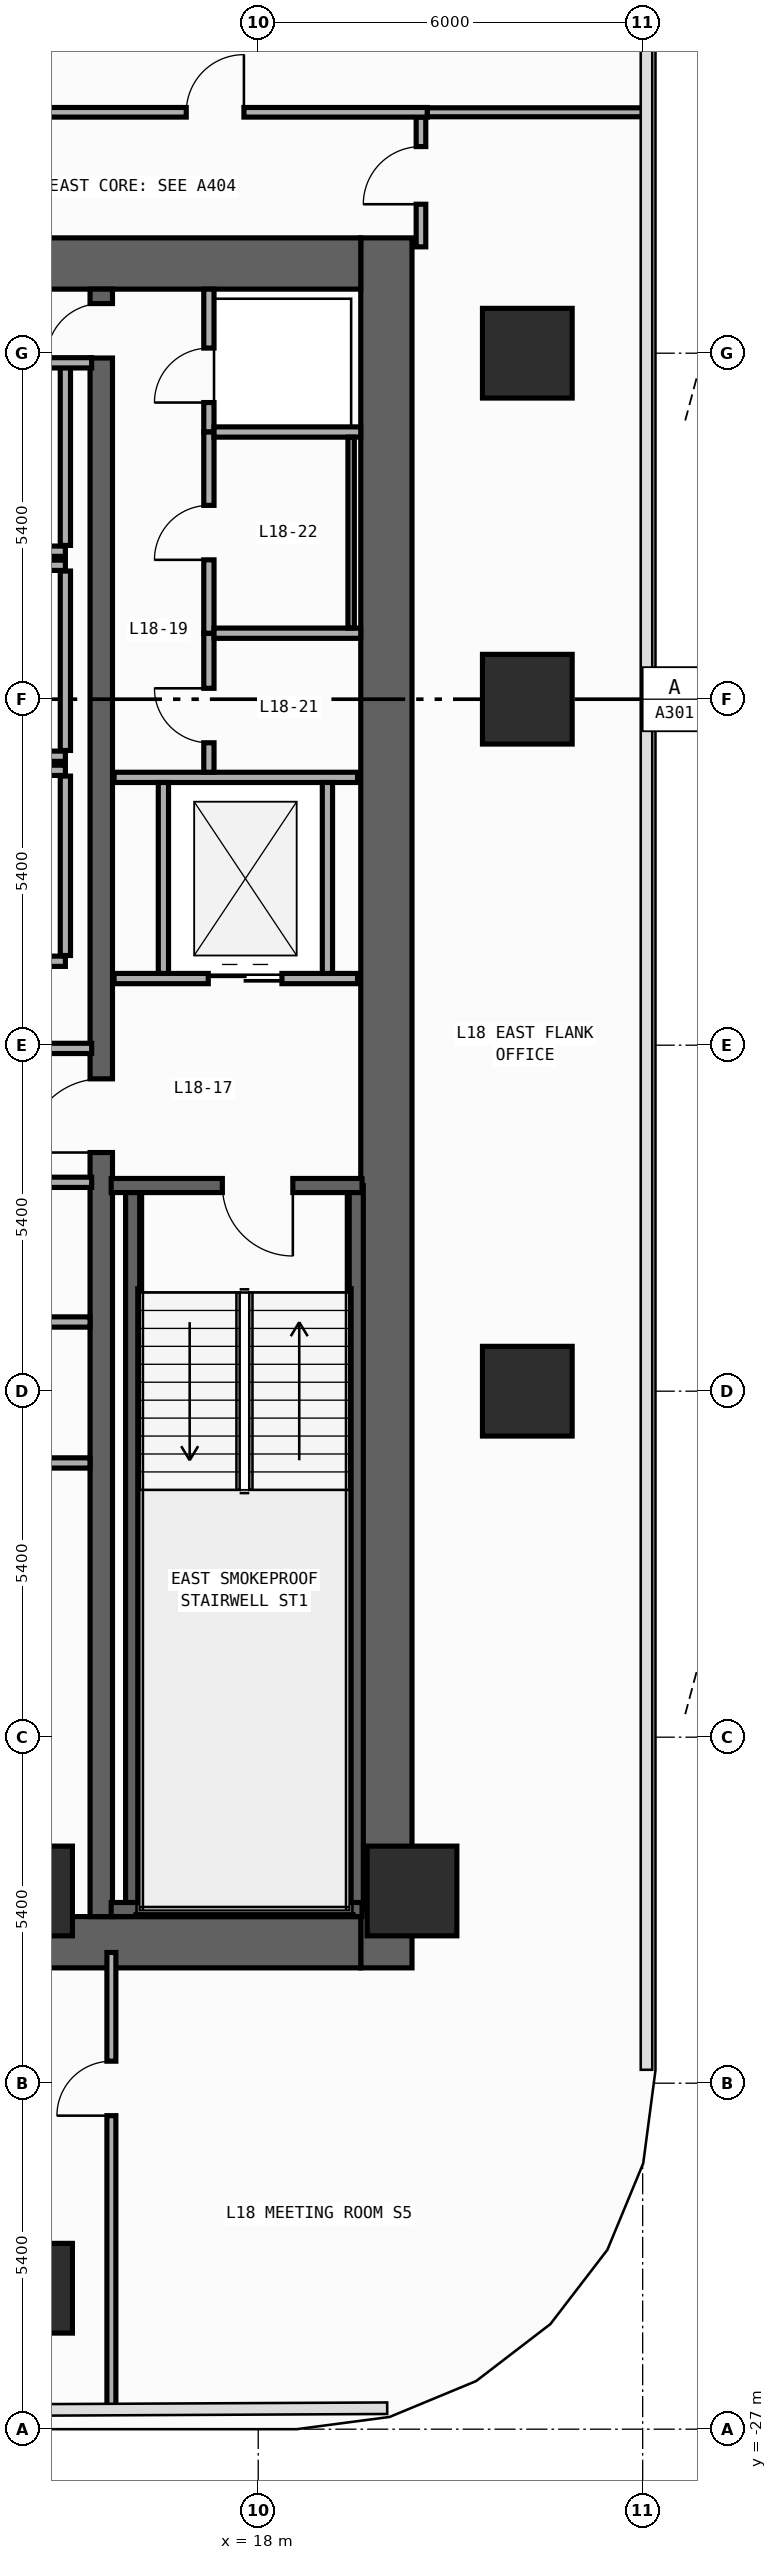
"""IFC4 building model, lengths in metres.
Left out: names, types, materials, properties, quantities, classifications, styles, units other than length and angle.
Written with IfcOpenShell. Run it as: python <this file> out.ifc"""

import sys

from ifc_helpers import new_model, si_unit, direction, frame, frame_2d, origin, origin_2d, place, context, subcontext, project, spatial, rectangle, extrude, element, fill, save


model = new_model("IFC4")
c1 = context("Model", 3, precision=1e-05, world=origin(), true_north=direction((0.0, 1.0)))
c2 = subcontext(c1, "Body", "Model", "MODEL_VIEW")
j1 = project(units=[si_unit("LENGTHUNIT", "METRE"), si_unit("PLANEANGLEUNIT", "RADIAN")], contexts=[c1])
p1 = place(None, origin())
s1 = spatial("IfcSite", under=j1, at=p1, CompositionType="ELEMENT")
p2 = place(p1, origin())
s2 = spatial("IfcBuilding", under=s1, at=p2, CompositionType="ELEMENT")
p3 = place(p2, frame((0.0, 0.0, 76.4)))
s3 = spatial("IfcBuildingStorey", under=s2, at=p3, CompositionType="ELEMENT", Elevation=76.4)
p4 = place(p3, frame((20.0, -19.8, 0.0), z_axis=(0.0, 0.0, 1.0), x_axis=(0.0, 1.0, 0.0)))
e1 = element("IfcWall", 1, at=p4, inside=s3, PredefinedType="SHEAR", context=c2, shape_type="SweptSolid", body=[
    extrude(rectangle(XDim=27.0, YDim=0.8, at=frame_2d((13.5, 0.0))), origin(), (0.0, 0.0, 1.0), 3.94),
])
for number, where, z_axis, x_axis in (
    (2, (12.8, -19.4, 0.0), (0.0, 0.0, 1.0), (1.0, 0.0, 0.0)),
    (3, (12.8, 6.8, 0.0), (0.0, 0.0, 1.0), (1.0, 0.0, 0.0)),
):
    element("IfcWall", number, at=place(p3, frame(where, z_axis=z_axis, x_axis=x_axis)), inside=s3, PredefinedType="SHEAR", context=c2, shape_type="SweptSolid", body=[
        extrude(rectangle(XDim=6.8, YDim=0.8, at=frame_2d((3.4, 0.0))), origin(), (0.0, 0.0, 1.0), 3.94),
    ])
p5 = place(p3, frame((15.55, -19.0, 0.0), z_axis=(0.0, 0.0, 1.0), x_axis=(0.0, 1.0, 0.0)))
e4 = element("IfcWall", 4, at=p5, inside=s3, PredefinedType="SHEAR", context=c2, shape_type="SweptSolid", body=[
    extrude(rectangle(XDim=25.4, YDim=0.35, at=frame_2d((12.7, 0.0))), origin(), (0.0, 0.0, 1.0), 3.94),
])
p6 = place(p5, frame((11.925, 0.0, 0.0)))
e5 = element("IfcOpeningElement", 5, at=p6, cuts=e4, PredefinedType="OPENING", context=c2, shape_type="SweptSolid", body=[
    extrude(rectangle(XDim=1.15, YDim=2.2, at=frame_2d((0.575, 1.1))), frame((0.0, 0.185, 0.0), z_axis=(0.0, -1.0, 0.0), x_axis=(1.0, 0.0, 0.0)), (0.0, 0.0, 1.0), 0.37),
])
p7 = place(p5, frame((24.325, 0.0, 0.0)))
e6 = element("IfcOpeningElement", 6, at=p7, cuts=e4, PredefinedType="OPENING", context=c2, shape_type="SweptSolid", body=[
    extrude(rectangle(XDim=0.85, YDim=2.1, at=frame_2d((0.425, 1.05))), frame((0.0, 0.185, 0.0), z_axis=(0.0, -1.0, 0.0), x_axis=(1.0, 0.0, 0.0)), (0.0, 0.0, 1.0), 0.37),
])
for number, where, z_axis, x_axis in (
    (7, (16.04, -18.89, 0.0), (0.0, 0.0, 1.0), (0.0, 1.0, 0.0)),
    (8, (19.53, -18.89, 0.0), (0.0, 0.0, 1.0), (0.0, 1.0, 0.0)),
):
    element("IfcWall", number, at=place(p3, frame(where, z_axis=z_axis, x_axis=x_axis)), inside=s3, PredefinedType="SHEAR", context=c2, shape_type="SweptSolid", body=[
        extrude(rectangle(XDim=11.3, YDim=0.22, at=frame_2d((5.65, 0.0))), origin(), (0.0, 0.0, 1.0), 3.94),
    ])
p8 = place(p3, frame((15.705, -18.89, 0.0), z_axis=(0.0, 0.0, 1.0), x_axis=(1.0, 0.0, 0.0)))
e9 = element("IfcWall", 9, at=p8, inside=s3, PredefinedType="SHEAR", context=c2, shape_type="SweptSolid", body=[
    extrude(rectangle(XDim=3.915, YDim=0.22, at=frame_2d((1.958, 0.0))), origin(), (0.0, 0.0, 1.0), 3.94),
])
p9 = place(p3, frame((19.62, -7.59, 0.0), z_axis=(0.0, 0.0, 1.0), x_axis=(-1.0, 0.0, 0.0)))
e10 = element("IfcWall", 10, at=p9, inside=s3, PredefinedType="SHEAR", context=c2, shape_type="SweptSolid", body=[
    extrude(rectangle(XDim=3.915, YDim=0.22, at=frame_2d((1.958, 0.0))), origin(), (0.0, 0.0, 1.0), 3.94),
])
p10 = place(p9, frame((1.08, 0.0, 0.0)))
e11 = element("IfcOpeningElement", 11, at=p10, cuts=e10, PredefinedType="OPENING", context=c2, shape_type="SweptSolid", body=[
    extrude(rectangle(XDim=1.1, YDim=2.2, at=frame_2d((0.55, 1.1))), frame((0.0, 0.12, 0.0), z_axis=(0.0, -1.0, 0.0), x_axis=(1.0, 0.0, 0.0)), (0.0, 0.0, 1.0), 0.24),
])
for number, where, z_axis, x_axis in (
    (12, (20.4, -18.6, 0.0), (0.0, 0.0, 1.0), (1.0, 0.0, 0.0)),
    (13, (14.4, -18.6, 0.0), (0.0, 0.0, 1.0), (1.0, 0.0, 0.0)),
    (14, (22.2, -10.8, 0.0), (0.0, 0.0, 1.0), (1.0, 0.0, 0.0)),
    (15, (22.2, 0.0, 0.0), (0.0, 0.0, 1.0), (1.0, 0.0, 0.0)),
    (16, (22.2, 5.4, 0.0), (0.0, 0.0, 1.0), (1.0, 0.0, 0.0)),
    (17, (14.4, -24.8, 0.0), (0.0, 0.0, 1.0), (1.0, 0.0, 0.0)),
):
    element("IfcColumn", number, at=place(p3, frame(where, z_axis=z_axis, x_axis=x_axis)), inside=s3, PredefinedType="COLUMN", context=c2, shape_type="SweptSolid", body=[
        extrude(rectangle(XDim=1.4, YDim=1.4, at=origin_2d()), origin(), (0.0, 0.0, 1.0), 4.2),
    ])
p11 = place(p3, frame((12.8, 2.31, 0.0), z_axis=(0.0, 0.0, 1.0), x_axis=(1.0, 0.0, 0.0)))
e18 = element("IfcWall", 18, at=p11, inside=s3, PredefinedType="STANDARD", context=c2, shape_type="SweptSolid", body=[
    extrude(rectangle(XDim=2.19, YDim=0.16, at=frame_2d((1.095, 0.0))), origin(), (0.0, 0.0, 1.0), 3.94),
])
p12 = place(p3, frame((14.99, 2.4, 0.0), z_axis=(0.0, 0.0, 1.0), x_axis=(0.0, 1.0, 0.0)))
e19 = element("IfcWall", 19, at=p12, inside=s3, PredefinedType="STANDARD", context=c2, shape_type="SweptSolid", body=[
    extrude(rectangle(XDim=2.8, YDim=0.16, at=frame_2d((1.4, 0.0))), origin(), (0.0, 0.0, 1.0), 3.94),
])
for number, where, z_axis, x_axis in (
    (20, (12.8, -0.89, 0.0), (0.0, 0.0, 1.0), (1.0, 0.0, 0.0)),
    (21, (12.8, 2.09, 0.0), (0.0, 0.0, 1.0), (1.0, 0.0, 0.0)),
):
    element("IfcWall", number, at=place(p3, frame(where, z_axis=z_axis, x_axis=x_axis)), inside=s3, PredefinedType="STANDARD", context=c2, shape_type="SweptSolid", body=[
        extrude(rectangle(XDim=2.19, YDim=0.16, at=frame_2d((1.095, 0.0))), origin(), (0.0, 0.0, 1.0), 3.94),
    ])
p13 = place(p3, frame((14.99, -0.8, 0.0), z_axis=(0.0, 0.0, 1.0), x_axis=(0.0, 1.0, 0.0)))
e22 = element("IfcWall", 22, at=p13, inside=s3, PredefinedType="STANDARD", context=c2, shape_type="SweptSolid", body=[
    extrude(rectangle(XDim=2.8, YDim=0.16, at=frame_2d((1.4, 0.0))), origin(), (0.0, 0.0, 1.0), 3.94),
])
for number, where, z_axis, x_axis in (
    (23, (12.8, -4.09, 0.0), (0.0, 0.0, 1.0), (1.0, 0.0, 0.0)),
    (24, (12.8, -1.11, 0.0), (0.0, 0.0, 1.0), (1.0, 0.0, 0.0)),
):
    element("IfcWall", number, at=place(p3, frame(where, z_axis=z_axis, x_axis=x_axis)), inside=s3, PredefinedType="STANDARD", context=c2, shape_type="SweptSolid", body=[
        extrude(rectangle(XDim=2.19, YDim=0.16, at=frame_2d((1.095, 0.0))), origin(), (0.0, 0.0, 1.0), 3.94),
    ])
p14 = place(p3, frame((14.99, -4.0, 0.0), z_axis=(0.0, 0.0, 1.0), x_axis=(0.0, 1.0, 0.0)))
e25 = element("IfcWall", 25, at=p14, inside=s3, PredefinedType="STANDARD", context=c2, shape_type="SweptSolid", body=[
    extrude(rectangle(XDim=2.8, YDim=0.16, at=frame_2d((1.4, 0.0))), origin(), (0.0, 0.0, 1.0), 3.94),
])
p15 = place(p3, frame((15.75, -4.36, 0.0), z_axis=(0.0, 0.0, 1.0), x_axis=(1.0, 0.0, 0.0)))
e26 = element("IfcWall", 26, at=p15, inside=s3, PredefinedType="STANDARD", context=c2, shape_type="SweptSolid", body=[
    extrude(rectangle(XDim=3.8, YDim=0.16, at=frame_2d((1.9, 0.0))), origin(), (0.0, 0.0, 1.0), 3.94),
])
p16 = place(p15, frame((1.47, 0.0, 0.0)))
e27 = element("IfcOpeningElement", 27, at=p16, cuts=e26, PredefinedType="OPENING", context=c2, shape_type="SweptSolid", body=[
    extrude(rectangle(XDim=1.15, YDim=2.2, at=frame_2d((0.575, 1.1))), frame((0.0, 0.09, 0.0), z_axis=(0.0, -1.0, 0.0), x_axis=(1.0, 0.0, 0.0)), (0.0, 0.0, 1.0), 0.18),
])
p17 = place(p3, frame((15.75, -1.22, 0.0), z_axis=(0.0, 0.0, 1.0), x_axis=(1.0, 0.0, 0.0)))
e28 = element("IfcWall", 28, at=p17, inside=s3, PredefinedType="STANDARD", context=c2, shape_type="SweptSolid", body=[
    extrude(rectangle(XDim=3.8, YDim=0.16, at=frame_2d((1.9, 0.0))), origin(), (0.0, 0.0, 1.0), 3.94),
])
for number, where, z_axis, x_axis in (
    (29, (16.52, -4.28, 0.0), (0.0, 0.0, 1.0), (0.0, 1.0, 0.0)),
    (30, (19.08, -4.28, 0.0), (0.0, 0.0, 1.0), (0.0, 1.0, 0.0)),
):
    element("IfcWall", number, at=place(p3, frame(where, z_axis=z_axis, x_axis=x_axis)), inside=s3, PredefinedType="STANDARD", context=c2, shape_type="SweptSolid", body=[
        extrude(rectangle(XDim=2.98, YDim=0.16, at=frame_2d((1.49, 0.0))), origin(), (0.0, 0.0, 1.0), 3.94),
    ])
for number, where, z_axis, x_axis in (
    (31, (12.8, -5.45, 0.0), (0.0, 0.0, 1.0), (1.0, 0.0, 0.0)),
    (32, (12.8, -7.54, 0.0), (0.0, 0.0, 1.0), (1.0, 0.0, 0.0)),
    (33, (12.8, 5.25, 0.0), (0.0, 0.0, 1.0), (1.0, 0.0, 0.0)),
):
    element("IfcWall", number, at=place(p3, frame(where, z_axis=z_axis, x_axis=x_axis)), inside=s3, PredefinedType="STANDARD", context=c2, shape_type="SweptSolid", body=[
        extrude(rectangle(XDim=2.6, YDim=0.16, at=frame_2d((1.3, 0.0))), origin(), (0.0, 0.0, 1.0), 3.94),
    ])
p18 = place(p3, frame((17.23, 4.17, 0.0), z_axis=(0.0, 0.0, 1.0), x_axis=(0.0, 1.0, 0.0)))
e34 = element("IfcWall", 34, at=p18, inside=s3, PredefinedType="PARTITIONING", context=c2, shape_type="SweptSolid", body=[
    extrude(rectangle(XDim=2.23, YDim=0.16, at=frame_2d((1.115, 0.0))), origin(), (0.0, 0.0, 1.0), 3.94),
])
p19 = place(p18, frame((0.46, 0.0, 0.0)))
e35 = element("IfcOpeningElement", 35, at=p19, cuts=e34, PredefinedType="OPENING", context=c2, shape_type="SweptSolid", body=[
    extrude(rectangle(XDim=0.85, YDim=2.1, at=frame_2d((0.425, 1.05))), frame((0.0, 0.09, 0.0), z_axis=(0.0, -1.0, 0.0), x_axis=(1.0, 0.0, 0.0)), (0.0, 0.0, 1.0), 0.18),
])
p20 = place(p3, frame((17.23, -1.14, 0.0), z_axis=(0.0, 0.0, 1.0), x_axis=(0.0, 1.0, 0.0)))
e36 = element("IfcWall", 36, at=p20, inside=s3, PredefinedType="PARTITIONING", context=c2, shape_type="SweptSolid", body=[
    extrude(rectangle(XDim=2.17, YDim=0.16, at=frame_2d((1.085, 0.0))), origin(), (0.0, 0.0, 1.0), 3.94),
])
p21 = place(p20, frame((0.46, 0.0, 0.0)))
e37 = element("IfcOpeningElement", 37, at=p21, cuts=e36, PredefinedType="OPENING", context=c2, shape_type="SweptSolid", body=[
    extrude(rectangle(XDim=0.85, YDim=2.1, at=frame_2d((0.425, 1.05))), frame((0.0, 0.09, 0.0), z_axis=(0.0, -1.0, 0.0), x_axis=(1.0, 0.0, 0.0)), (0.0, 0.0, 1.0), 0.18),
])
p22 = place(p3, frame((17.23, 1.03, 0.0), z_axis=(0.0, 0.0, 1.0), x_axis=(0.0, 1.0, 0.0)))
e38 = element("IfcWall", 38, at=p22, inside=s3, PredefinedType="PARTITIONING", context=c2, shape_type="SweptSolid", body=[
    extrude(rectangle(XDim=3.14, YDim=0.16, at=frame_2d((1.57, 0.0))), origin(), (0.0, 0.0, 1.0), 3.94),
])
p23 = place(p22, frame((1.145, 0.0, 0.0)))
e39 = element("IfcOpeningElement", 39, at=p23, cuts=e38, PredefinedType="OPENING", context=c2, shape_type="SweptSolid", body=[
    extrude(rectangle(XDim=0.85, YDim=2.1, at=frame_2d((0.425, 1.05))), frame((0.0, 0.09, 0.0), z_axis=(0.0, -1.0, 0.0), x_axis=(1.0, 0.0, 0.0)), (0.0, 0.0, 1.0), 0.18),
])
for number, where, z_axis, x_axis in (
    (40, (17.31, 4.17, 0.0), (0.0, 0.0, 1.0), (1.0, 0.0, 0.0)),
    (41, (17.31, 1.03, 0.0), (0.0, 0.0, 1.0), (1.0, 0.0, 0.0)),
):
    element("IfcWall", number, at=place(p3, frame(where, z_axis=z_axis, x_axis=x_axis)), inside=s3, PredefinedType="PARTITIONING", context=c2, shape_type="SweptSolid", body=[
        extrude(rectangle(XDim=2.29, YDim=0.16, at=frame_2d((1.145, 0.0))), origin(), (0.0, 0.0, 1.0), 3.94),
    ])
for number, where, z_axis, x_axis in (
    (42, (12.31, -11.92, 0.0), (0.0, 0.0, 1.0), (1.0, 0.0, 0.0)),
    (43, (12.31, -9.72, 0.0), (0.0, 0.0, 1.0), (1.0, 0.0, 0.0)),
):
    element("IfcWall", number, at=place(p3, frame(where, z_axis=z_axis, x_axis=x_axis)), inside=s3, PredefinedType="PARTITIONING", context=c2, shape_type="SweptSolid", body=[
        extrude(rectangle(XDim=3.065, YDim=0.16, at=frame_2d((1.532, 0.0))), origin(), (0.0, 0.0, 1.0), 3.94),
    ])
p24 = place(p3, frame((20.54, 7.06, 0.0), z_axis=(0.0, 0.0, 1.0), x_axis=(0.0, 1.0, 0.0)))
e44 = element("IfcWall", 44, at=p24, inside=s3, PredefinedType="PARTITIONING", context=c2, shape_type="SweptSolid", body=[
    extrude(rectangle(XDim=2.025, YDim=0.15, at=frame_2d((1.012, 0.0))), origin(), (0.0, 0.0, 1.0), 3.94),
])
p25 = place(p24, frame((0.665, 0.0, 0.0)))
e45 = element("IfcOpeningElement", 45, at=p25, cuts=e44, PredefinedType="OPENING", context=c2, shape_type="SweptSolid", body=[
    extrude(rectangle(XDim=0.9, YDim=2.15, at=frame_2d((0.45, 1.075))), frame((0.0, 0.085, 0.0), z_axis=(0.0, -1.0, 0.0), x_axis=(1.0, 0.0, 0.0)), (0.0, 0.0, 1.0), 0.17),
])
p26 = place(p3, frame((11.81, 9.16, 0.0), z_axis=(0.0, 0.0, 1.0), x_axis=(1.0, 0.0, 0.0)))
e46 = element("IfcWall", 46, at=p26, inside=s3, PredefinedType="PARTITIONING", context=c2, shape_type="SweptSolid", body=[
    extrude(rectangle(XDim=8.83, YDim=0.15, at=frame_2d((4.415, 0.0))), origin(), (0.0, 0.0, 1.0), 3.94),
])
p27 = place(p26, frame((5.067, 0.0, 0.0)))
e47 = element("IfcOpeningElement", 47, at=p27, cuts=e46, PredefinedType="OPENING", context=c2, shape_type="SweptSolid", body=[
    extrude(rectangle(XDim=0.9, YDim=2.15, at=frame_2d((0.45, 1.075))), frame((0.0, 0.085, 0.0), z_axis=(0.0, -1.0, 0.0), x_axis=(1.0, 0.0, 0.0)), (0.0, 0.0, 1.0), 0.17),
])
p28 = place(p3, frame((20.64, 9.16, 0.0), z_axis=(0.0, 0.0, 1.0), x_axis=(1.0, 0.0, 0.0)))
e48 = element("IfcWall", 48, at=p28, inside=s3, PredefinedType="PARTITIONING", context=c2, shape_type="SweptSolid", body=[
    extrude(rectangle(XDim=3.415, YDim=0.14, at=frame_2d((1.708, 0.0))), origin(), (0.0, 0.0, 1.0), 3.94),
])
p29 = place(p3, frame((15.708, -26.689, 0.0), z_axis=(0.0, 0.0, 1.0), x_axis=(0.0, 1.0, 0.0)))
e49 = element("IfcWall", 49, at=p29, inside=s3, PredefinedType="PARTITIONING", context=c2, shape_type="SweptSolid", body=[
    extrude(rectangle(XDim=7.129, YDim=0.14, at=frame_2d((3.564, 0.0))), origin(), (0.0, 0.0, 1.0), 3.94),
])
p30 = place(p29, frame((4.582, 0.0, 0.0)))
e50 = element("IfcOpeningElement", 50, at=p30, cuts=e49, PredefinedType="OPENING", context=c2, shape_type="SweptSolid", body=[
    extrude(rectangle(XDim=0.85, YDim=2.1, at=frame_2d((0.425, 1.05))), frame((0.0, 0.08, 0.0), z_axis=(0.0, -1.0, 0.0), x_axis=(1.0, 0.0, 0.0)), (0.0, 0.0, 1.0), 0.16),
])
p31 = place(p3, frame((19.45, 4.09, 0.0), z_axis=(0.0, 0.0, 1.0), x_axis=(0.0, -1.0, 0.0)))
e51 = element("IfcWall", 51, at=p31, inside=s3, PredefinedType="PARTITIONING", context=c2, shape_type="SweptSolid", body=[
    extrude(rectangle(XDim=2.98, YDim=0.1, at=frame_2d((1.49, 0.0))), origin(), (0.0, 0.0, 1.0), 3.94),
])
p32 = place(p10, origin())
e52 = element("IfcDoor", 52, at=p32, inside=s3, OperationType="SINGLE_SWING_LEFT", PredefinedType="DOOR", context=c2, shape_type="SweptSolid", body=[
    extrude(rectangle(XDim=1.1, YDim=2.2, at=frame_2d((0.55, 1.1))), frame((0.0, 0.025, 0.0), z_axis=(0.0, -1.0, 0.0), x_axis=(1.0, 0.0, 0.0)), (0.0, 0.0, 1.0), 0.05),
])
fill(e11, e52)
p33 = place(p6, origin())
e53 = element("IfcDoor", 53, at=p33, inside=s3, OperationType="SINGLE_SWING_LEFT", PredefinedType="DOOR", context=c2, shape_type="SweptSolid", body=[
    extrude(rectangle(XDim=1.15, YDim=2.2, at=frame_2d((0.575, 1.1))), frame((0.0, 0.025, 0.0), z_axis=(0.0, -1.0, 0.0), x_axis=(1.0, 0.0, 0.0)), (0.0, 0.0, 1.0), 0.05),
])
fill(e5, e53)
p34 = place(p7, origin())
e54 = element("IfcDoor", 54, at=p34, inside=s3, OperationType="SINGLE_SWING_LEFT", PredefinedType="DOOR", context=c2, shape_type="SweptSolid", body=[
    extrude(rectangle(XDim=0.85, YDim=2.1, at=frame_2d((0.425, 1.05))), frame((0.0, 0.025, 0.0), z_axis=(0.0, -1.0, 0.0), x_axis=(1.0, 0.0, 0.0)), (0.0, 0.0, 1.0), 0.05),
])
fill(e6, e54)
p35 = place(p16, origin())
e55 = element("IfcDoor", 55, at=p35, inside=s3, OperationType="DOUBLE_DOOR_SLIDING", PredefinedType="DOOR", context=c2, shape_type="SweptSolid", body=[
    extrude(rectangle(XDim=1.15, YDim=2.2, at=frame_2d((0.575, 1.1))), frame((0.0, 0.025, 0.0), z_axis=(0.0, -1.0, 0.0), x_axis=(1.0, 0.0, 0.0)), (0.0, 0.0, 1.0), 0.05),
])
fill(e27, e55)
p36 = place(p19, origin())
e56 = element("IfcDoor", 56, at=p36, inside=s3, OperationType="SINGLE_SWING_LEFT", PredefinedType="DOOR", context=c2, shape_type="SweptSolid", body=[
    extrude(rectangle(XDim=0.85, YDim=2.1, at=frame_2d((0.425, 1.05))), frame((0.0, 0.025, 0.0), z_axis=(0.0, -1.0, 0.0), x_axis=(1.0, 0.0, 0.0)), (0.0, 0.0, 1.0), 0.05),
])
fill(e35, e56)
p37 = place(p21, origin())
e57 = element("IfcDoor", 57, at=p37, inside=s3, OperationType="SINGLE_SWING_RIGHT", PredefinedType="DOOR", context=c2, shape_type="SweptSolid", body=[
    extrude(rectangle(XDim=0.85, YDim=2.1, at=frame_2d((0.425, 1.05))), frame((0.0, 0.025, 0.0), z_axis=(0.0, -1.0, 0.0), x_axis=(1.0, 0.0, 0.0)), (0.0, 0.0, 1.0), 0.05),
])
fill(e37, e57)
p38 = place(p23, origin())
e58 = element("IfcDoor", 58, at=p38, inside=s3, OperationType="SINGLE_SWING_LEFT", PredefinedType="DOOR", context=c2, shape_type="SweptSolid", body=[
    extrude(rectangle(XDim=0.85, YDim=2.1, at=frame_2d((0.425, 1.05))), frame((0.0, 0.025, 0.0), z_axis=(0.0, -1.0, 0.0), x_axis=(1.0, 0.0, 0.0)), (0.0, 0.0, 1.0), 0.05),
])
fill(e39, e58)
p39 = place(p25, origin())
e59 = element("IfcDoor", 59, at=p39, inside=s3, OperationType="SINGLE_SWING_LEFT", PredefinedType="DOOR", context=c2, shape_type="SweptSolid", body=[
    extrude(rectangle(XDim=0.9, YDim=2.15, at=frame_2d((0.45, 1.075))), frame((0.0, 0.025, 0.0), z_axis=(0.0, -1.0, 0.0), x_axis=(1.0, 0.0, 0.0)), (0.0, 0.0, 1.0), 0.05),
])
fill(e45, e59)
p40 = place(p27, origin())
e60 = element("IfcDoor", 60, at=p40, inside=s3, OperationType="SINGLE_SWING_RIGHT", PredefinedType="DOOR", context=c2, shape_type="SweptSolid", body=[
    extrude(rectangle(XDim=0.9, YDim=2.15, at=frame_2d((0.45, 1.075))), frame((0.0, 0.025, 0.0), z_axis=(0.0, -1.0, 0.0), x_axis=(1.0, 0.0, 0.0)), (0.0, 0.0, 1.0), 0.05),
])
fill(e47, e60)
p41 = place(p30, origin())
e61 = element("IfcDoor", 61, at=p41, inside=s3, OperationType="SINGLE_SWING_LEFT", PredefinedType="DOOR", context=c2, shape_type="SweptSolid", body=[
    extrude(rectangle(XDim=0.85, YDim=2.1, at=frame_2d((0.425, 1.05))), frame((0.0, 0.025, 0.0), z_axis=(0.0, -1.0, 0.0), x_axis=(1.0, 0.0, 0.0)), (0.0, 0.0, 1.0), 0.05),
])
fill(e50, e61)
save(model, sys.argv[1])
